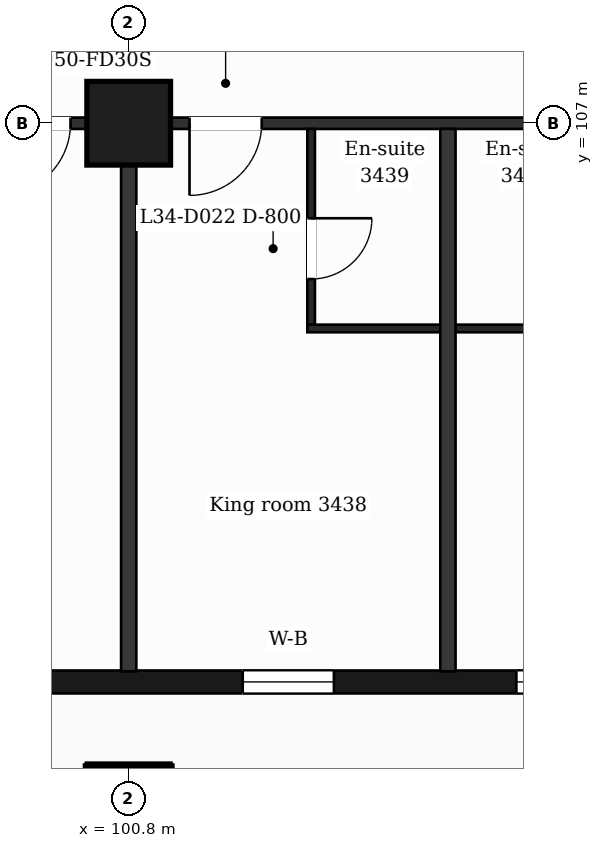
"""IFC4 building model, lengths in metres.
Left out: names, types, materials, properties, quantities, classifications, styles, units other than length and angle.
Written with IfcOpenShell. Run it as: python <this file> out.ifc"""

import sys

from ifc_helpers import new_model, si_unit, direction, frame, frame_2d, origin, origin_2d, place, context, subcontext, project, spatial, rectangle, extrude, element, fill, save


model = new_model("IFC4")
c1 = context("Model", 3, precision=1e-05, world=origin(), true_north=direction((0.0, 1.0)))
c2 = subcontext(c1, "Body", "Model", "MODEL_VIEW")
j1 = project(units=[si_unit("LENGTHUNIT", "METRE"), si_unit("PLANEANGLEUNIT", "RADIAN")], contexts=[c1])
p1 = place(None, origin())
s1 = spatial("IfcSite", under=j1, at=p1, CompositionType="ELEMENT")
p2 = place(p1, origin())
s2 = spatial("IfcBuilding", under=s1, at=p2, CompositionType="ELEMENT")
p3 = place(p2, frame((0.0, 0.0, 147.8)))
s3 = spatial("IfcBuildingStorey", under=s2, at=p3, CompositionType="ELEMENT", Elevation=147.8)
for number, where, z_axis, x_axis in (
    (1, (100.8, 98.0, 0.0), (0.0, 0.0, 1.0), (1.0, 0.0, 0.0)),
    (2, (100.8, 107.0, 0.0), (0.0, 0.0, 1.0), (1.0, 0.0, 0.0)),
):
    element("IfcColumn", number, at=place(p3, frame(where, z_axis=z_axis, x_axis=x_axis)), inside=s3, PredefinedType="COLUMN", context=c2, shape_type="SweptSolid", body=[
        extrude(rectangle(XDim=1.1, YDim=1.1, at=origin_2d()), origin(), (0.0, 0.0, 1.0), 3.7),
    ])
p4 = place(p3, frame((89.85, 99.65, 0.0), z_axis=(0.0, 0.0, 1.0), x_axis=(1.0, 0.0, 0.0)))
e3 = element("IfcWall", 3, at=p4, inside=s3, PredefinedType="SOLIDWALL", context=c2, shape_type="SweptSolid", body=[
    extrude(rectangle(XDim=47.25, YDim=0.3, at=frame_2d((23.625, 0.0))), origin(), (0.0, 0.0, 1.0), 3.38),
])
p5 = place(p4, frame((0.725, 0.0, 0.9)))
e4 = element("IfcOpeningElement", 4, at=p5, cuts=e3, PredefinedType="OPENING", context=c2, shape_type="SweptSolid", body=[
    extrude(rectangle(XDim=1.2, YDim=2.1, at=frame_2d((0.6, 1.05))), frame((0.0, 0.16, 0.0), z_axis=(0.0, -1.0, 0.0), x_axis=(1.0, 0.0, 0.0)), (0.0, 0.0, 1.0), 0.32),
])
p6 = place(p4, frame((3.45, 0.0, 0.9)))
e5 = element("IfcOpeningElement", 5, at=p6, cuts=e3, PredefinedType="OPENING", context=c2, shape_type="SweptSolid", body=[
    extrude(rectangle(XDim=2.4, YDim=2.1, at=frame_2d((1.2, 1.05))), frame((0.0, 0.16, 0.0), z_axis=(0.0, -1.0, 0.0), x_axis=(1.0, 0.0, 0.0)), (0.0, 0.0, 1.0), 0.32),
])
p7 = place(p4, frame((8.25, 0.0, 0.9)))
e6 = element("IfcOpeningElement", 6, at=p7, cuts=e3, PredefinedType="OPENING", context=c2, shape_type="SweptSolid", body=[
    extrude(rectangle(XDim=1.2, YDim=2.1, at=frame_2d((0.6, 1.05))), frame((0.0, 0.16, 0.0), z_axis=(0.0, -1.0, 0.0), x_axis=(1.0, 0.0, 0.0)), (0.0, 0.0, 1.0), 0.32),
])
p8 = place(p4, frame((12.45, 0.0, 0.9)))
e7 = element("IfcOpeningElement", 7, at=p8, cuts=e3, PredefinedType="OPENING", context=c2, shape_type="SweptSolid", body=[
    extrude(rectangle(XDim=1.2, YDim=2.1, at=frame_2d((0.6, 1.05))), frame((0.0, 0.16, 0.0), z_axis=(0.0, -1.0, 0.0), x_axis=(1.0, 0.0, 0.0)), (0.0, 0.0, 1.0), 0.32),
])
p9 = place(p4, frame((16.05, 0.0, 0.9)))
e8 = element("IfcOpeningElement", 8, at=p9, cuts=e3, PredefinedType="OPENING", context=c2, shape_type="SweptSolid", body=[
    extrude(rectangle(XDim=2.4, YDim=2.1, at=frame_2d((1.2, 1.05))), frame((0.0, 0.16, 0.0), z_axis=(0.0, -1.0, 0.0), x_axis=(1.0, 0.0, 0.0)), (0.0, 0.0, 1.0), 0.32),
])
p10 = place(p4, frame((20.25, 0.0, 0.9)))
e9 = element("IfcOpeningElement", 9, at=p10, cuts=e3, PredefinedType="OPENING", context=c2, shape_type="SweptSolid", body=[
    extrude(rectangle(XDim=2.4, YDim=2.1, at=frame_2d((1.2, 1.05))), frame((0.0, 0.16, 0.0), z_axis=(0.0, -1.0, 0.0), x_axis=(1.0, 0.0, 0.0)), (0.0, 0.0, 1.0), 0.32),
])
p11 = place(p4, frame((25.05, 0.0, 0.0)))
e10 = element("IfcOpeningElement", 10, at=p11, cuts=e3, PredefinedType="OPENING", context=c2, shape_type="SweptSolid", body=[
    extrude(rectangle(XDim=1.2, YDim=2.4, at=frame_2d((0.6, 1.2))), frame((0.0, 0.16, 0.0), z_axis=(0.0, -1.0, 0.0), x_axis=(1.0, 0.0, 0.0)), (0.0, 0.0, 1.0), 0.32),
])
p12 = place(p4, frame((28.65, 0.0, 0.9)))
e11 = element("IfcOpeningElement", 11, at=p12, cuts=e3, PredefinedType="OPENING", context=c2, shape_type="SweptSolid", body=[
    extrude(rectangle(XDim=2.4, YDim=2.1, at=frame_2d((1.2, 1.05))), frame((0.0, 0.16, 0.0), z_axis=(0.0, -1.0, 0.0), x_axis=(1.0, 0.0, 0.0)), (0.0, 0.0, 1.0), 0.32),
])
p13 = place(p4, frame((32.85, 0.0, 0.9)))
e12 = element("IfcOpeningElement", 12, at=p13, cuts=e3, PredefinedType="OPENING", context=c2, shape_type="SweptSolid", body=[
    extrude(rectangle(XDim=2.4, YDim=2.1, at=frame_2d((1.2, 1.05))), frame((0.0, 0.16, 0.0), z_axis=(0.0, -1.0, 0.0), x_axis=(1.0, 0.0, 0.0)), (0.0, 0.0, 1.0), 0.32),
])
p14 = place(p4, frame((37.65, 0.0, 0.9)))
e13 = element("IfcOpeningElement", 13, at=p14, cuts=e3, PredefinedType="OPENING", context=c2, shape_type="SweptSolid", body=[
    extrude(rectangle(XDim=1.2, YDim=2.1, at=frame_2d((0.6, 1.05))), frame((0.0, 0.16, 0.0), z_axis=(0.0, -1.0, 0.0), x_axis=(1.0, 0.0, 0.0)), (0.0, 0.0, 1.0), 0.32),
])
p15 = place(p4, frame((41.85, 0.0, 0.9)))
e14 = element("IfcOpeningElement", 14, at=p15, cuts=e3, PredefinedType="OPENING", context=c2, shape_type="SweptSolid", body=[
    extrude(rectangle(XDim=1.2, YDim=2.1, at=frame_2d((0.6, 1.05))), frame((0.0, 0.16, 0.0), z_axis=(0.0, -1.0, 0.0), x_axis=(1.0, 0.0, 0.0)), (0.0, 0.0, 1.0), 0.32),
])
p16 = place(p4, frame((45.25, 0.0, 0.9)))
e15 = element("IfcOpeningElement", 15, at=p16, cuts=e3, PredefinedType="OPENING", context=c2, shape_type="SweptSolid", body=[
    extrude(rectangle(XDim=1.2, YDim=2.1, at=frame_2d((0.6, 1.05))), frame((0.0, 0.16, 0.0), z_axis=(0.0, -1.0, 0.0), x_axis=(1.0, 0.0, 0.0)), (0.0, 0.0, 1.0), 0.32),
])
p17 = place(p3, frame((103.15, 104.3, 0.0), z_axis=(0.0, 0.0, 1.0), x_axis=(1.0, 0.0, 0.0)))
e16 = element("IfcWall", 16, at=p17, inside=s3, PredefinedType="PARTITIONING", context=c2, shape_type="SweptSolid", body=[
    extrude(rectangle(XDim=3.7, YDim=0.1, at=frame_2d((1.85, 0.0))), origin(), (0.0, 0.0, 1.0), 3.38),
])
p18 = place(p3, frame((87.018, 107.0, 0.0), z_axis=(0.0, 0.0, 1.0), x_axis=(1.0, 0.0, 0.0)))
e17 = element("IfcWall", 17, at=p18, inside=s3, PredefinedType="PARTITIONING", context=c2, shape_type="SweptSolid", body=[
    extrude(rectangle(XDim=52.765, YDim=0.15, at=frame_2d((26.382, 0.0))), origin(), (0.0, 0.0, 1.0), 3.38),
])
p19 = place(p18, frame((0.707, 0.0, 0.0)))
e18 = element("IfcOpeningElement", 18, at=p19, cuts=e17, PredefinedType="OPENING", context=c2, shape_type="SweptSolid", body=[
    extrude(rectangle(XDim=0.95, YDim=2.1, at=frame_2d((0.475, 1.05))), frame((0.0, 0.085, 0.0), z_axis=(0.0, -1.0, 0.0), x_axis=(1.0, 0.0, 0.0)), (0.0, 0.0, 1.0), 0.17),
])
p20 = place(p18, frame((7.645, 0.0, 0.0)))
e19 = element("IfcOpeningElement", 19, at=p20, cuts=e17, PredefinedType="OPENING", context=c2, shape_type="SweptSolid", body=[
    extrude(rectangle(XDim=0.95, YDim=2.1, at=frame_2d((0.475, 1.05))), frame((0.0, 0.085, 0.0), z_axis=(0.0, -1.0, 0.0), x_axis=(1.0, 0.0, 0.0)), (0.0, 0.0, 1.0), 0.17),
])
p21 = place(p18, frame((12.067, 0.0, 0.0)))
e20 = element("IfcOpeningElement", 20, at=p21, cuts=e17, PredefinedType="OPENING", context=c2, shape_type="SweptSolid", body=[
    extrude(rectangle(XDim=0.95, YDim=2.1, at=frame_2d((0.475, 1.05))), frame((0.0, 0.085, 0.0), z_axis=(0.0, -1.0, 0.0), x_axis=(1.0, 0.0, 0.0)), (0.0, 0.0, 1.0), 0.17),
])
p22 = place(p18, frame((14.582, 0.0, 0.0)))
e21 = element("IfcOpeningElement", 21, at=p22, cuts=e17, PredefinedType="OPENING", context=c2, shape_type="SweptSolid", body=[
    extrude(rectangle(XDim=0.95, YDim=2.1, at=frame_2d((0.475, 1.05))), frame((0.0, 0.085, 0.0), z_axis=(0.0, -1.0, 0.0), x_axis=(1.0, 0.0, 0.0)), (0.0, 0.0, 1.0), 0.17),
])
p23 = place(p18, frame((20.432, 0.0, 0.0)))
e22 = element("IfcOpeningElement", 22, at=p23, cuts=e17, PredefinedType="OPENING", context=c2, shape_type="SweptSolid", body=[
    extrude(rectangle(XDim=0.95, YDim=2.1, at=frame_2d((0.475, 1.05))), frame((0.0, 0.085, 0.0), z_axis=(0.0, -1.0, 0.0), x_axis=(1.0, 0.0, 0.0)), (0.0, 0.0, 1.0), 0.17),
])
p24 = place(p18, frame((23.532, 0.0, 0.0)))
e23 = element("IfcOpeningElement", 23, at=p24, cuts=e17, PredefinedType="OPENING", context=c2, shape_type="SweptSolid", body=[
    extrude(rectangle(XDim=1.0, YDim=2.1, at=frame_2d((0.5, 1.05))), frame((0.0, 0.085, 0.0), z_axis=(0.0, -1.0, 0.0), x_axis=(1.0, 0.0, 0.0)), (0.0, 0.0, 1.0), 0.17),
])
p25 = place(p18, frame((36.807, 0.0, 0.0)))
e24 = element("IfcOpeningElement", 24, at=p25, cuts=e17, PredefinedType="OPENING", context=c2, shape_type="SweptSolid", body=[
    extrude(rectangle(XDim=1.0, YDim=2.1, at=frame_2d((0.5, 1.05))), frame((0.0, 0.085, 0.0), z_axis=(0.0, -1.0, 0.0), x_axis=(1.0, 0.0, 0.0)), (0.0, 0.0, 1.0), 0.17),
])
p26 = place(p18, frame((43.457, 0.0, 0.0)))
e25 = element("IfcOpeningElement", 25, at=p26, cuts=e17, PredefinedType="OPENING", context=c2, shape_type="SweptSolid", body=[
    extrude(rectangle(XDim=0.95, YDim=2.1, at=frame_2d((0.475, 1.05))), frame((0.0, 0.085, 0.0), z_axis=(0.0, -1.0, 0.0), x_axis=(1.0, 0.0, 0.0)), (0.0, 0.0, 1.0), 0.17),
])
p27 = place(p18, frame((48.974, 0.0, 0.0)))
e26 = element("IfcOpeningElement", 26, at=p27, cuts=e17, PredefinedType="OPENING", context=c2, shape_type="SweptSolid", body=[
    extrude(rectangle(XDim=0.95, YDim=2.1, at=frame_2d((0.475, 1.05))), frame((0.0, 0.085, 0.0), z_axis=(0.0, -1.0, 0.0), x_axis=(1.0, 0.0, 0.0)), (0.0, 0.0, 1.0), 0.17),
])
p28 = place(p3, frame((100.8, 99.79, 0.0), z_axis=(0.0, 0.0, 1.0), x_axis=(0.0, 1.0, 0.0)))
e27 = element("IfcWall", 27, at=p28, inside=s3, PredefinedType="PARTITIONING", context=c2, shape_type="SweptSolid", body=[
    extrude(rectangle(XDim=7.135, YDim=0.2, at=frame_2d((3.567, 0.0))), origin(), (0.0, 0.0, 1.0), 3.38),
])
p29 = place(p3, frame((103.2, 104.35, 0.0), z_axis=(0.0, 0.0, 1.0), x_axis=(0.0, 1.0, 0.0)))
e28 = element("IfcWall", 28, at=p29, inside=s3, PredefinedType="PARTITIONING", context=c2, shape_type="SweptSolid", body=[
    extrude(rectangle(XDim=2.575, YDim=0.1, at=frame_2d((1.288, 0.0))), origin(), (0.0, 0.0, 1.0), 3.38),
])
p30 = place(p29, frame((0.6, 0.0, 0.0)))
e29 = element("IfcOpeningElement", 29, at=p30, cuts=e28, PredefinedType="OPENING", context=c2, shape_type="SweptSolid", body=[
    extrude(rectangle(XDim=0.8, YDim=2.1, at=frame_2d((0.4, 1.05))), frame((0.0, 0.06, 0.0), z_axis=(0.0, -1.0, 0.0), x_axis=(1.0, 0.0, 0.0)), (0.0, 0.0, 1.0), 0.12),
])
p31 = place(p3, frame((105.0, 99.79, 0.0), z_axis=(0.0, 0.0, 1.0), x_axis=(0.0, 1.0, 0.0)))
e30 = element("IfcWall", 30, at=p31, inside=s3, PredefinedType="PARTITIONING", context=c2, shape_type="SweptSolid", body=[
    extrude(rectangle(XDim=7.135, YDim=0.2, at=frame_2d((3.567, 0.0))), origin(), (0.0, 0.0, 1.0), 3.38),
])
p32 = place(p8, origin())
e31 = element("IfcWindow", 31, at=p32, inside=s3, PartitioningType="SINGLE_PANEL", PredefinedType="WINDOW", context=c2, shape_type="SweptSolid", body=[
    extrude(rectangle(XDim=1.2, YDim=2.1, at=frame_2d((0.6, 1.05))), frame((0.0, 0.03, 0.0), z_axis=(0.0, -1.0, 0.0), x_axis=(1.0, 0.0, 0.0)), (0.0, 0.0, 1.0), 0.06),
])
fill(e7, e31)
p33 = place(p9, origin())
e32 = element("IfcWindow", 32, at=p33, inside=s3, PartitioningType="SINGLE_PANEL", PredefinedType="WINDOW", context=c2, shape_type="SweptSolid", body=[
    extrude(rectangle(XDim=2.4, YDim=2.1, at=frame_2d((1.2, 1.05))), frame((0.0, 0.03, 0.0), z_axis=(0.0, -1.0, 0.0), x_axis=(1.0, 0.0, 0.0)), (0.0, 0.0, 1.0), 0.06),
])
fill(e8, e32)
p34 = place(p21, origin())
e33 = element("IfcDoor", 33, at=p34, inside=s3, OperationType="SINGLE_SWING_LEFT", PredefinedType="DOOR", context=c2, shape_type="SweptSolid", body=[
    extrude(rectangle(XDim=0.95, YDim=2.1, at=frame_2d((0.475, 1.05))), frame((0.0, 0.025, 0.0), z_axis=(0.0, -1.0, 0.0), x_axis=(1.0, 0.0, 0.0)), (0.0, 0.0, 1.0), 0.05),
])
fill(e20, e33)
p35 = place(p22, origin())
e34 = element("IfcDoor", 34, at=p35, inside=s3, OperationType="SINGLE_SWING_LEFT", PredefinedType="DOOR", context=c2, shape_type="SweptSolid", body=[
    extrude(rectangle(XDim=0.95, YDim=2.1, at=frame_2d((0.475, 1.05))), frame((0.0, 0.025, 0.0), z_axis=(0.0, -1.0, 0.0), x_axis=(1.0, 0.0, 0.0)), (0.0, 0.0, 1.0), 0.05),
])
fill(e21, e34)
p36 = place(p30, origin())
e35 = element("IfcDoor", 35, at=p36, inside=s3, OperationType="SINGLE_SWING_RIGHT", PredefinedType="DOOR", context=c2, shape_type="SweptSolid", body=[
    extrude(rectangle(XDim=0.8, YDim=2.1, at=frame_2d((0.4, 1.05))), frame((0.0, 0.025, 0.0), z_axis=(0.0, -1.0, 0.0), x_axis=(1.0, 0.0, 0.0)), (0.0, 0.0, 1.0), 0.05),
])
fill(e29, e35)
save(model, sys.argv[1])
